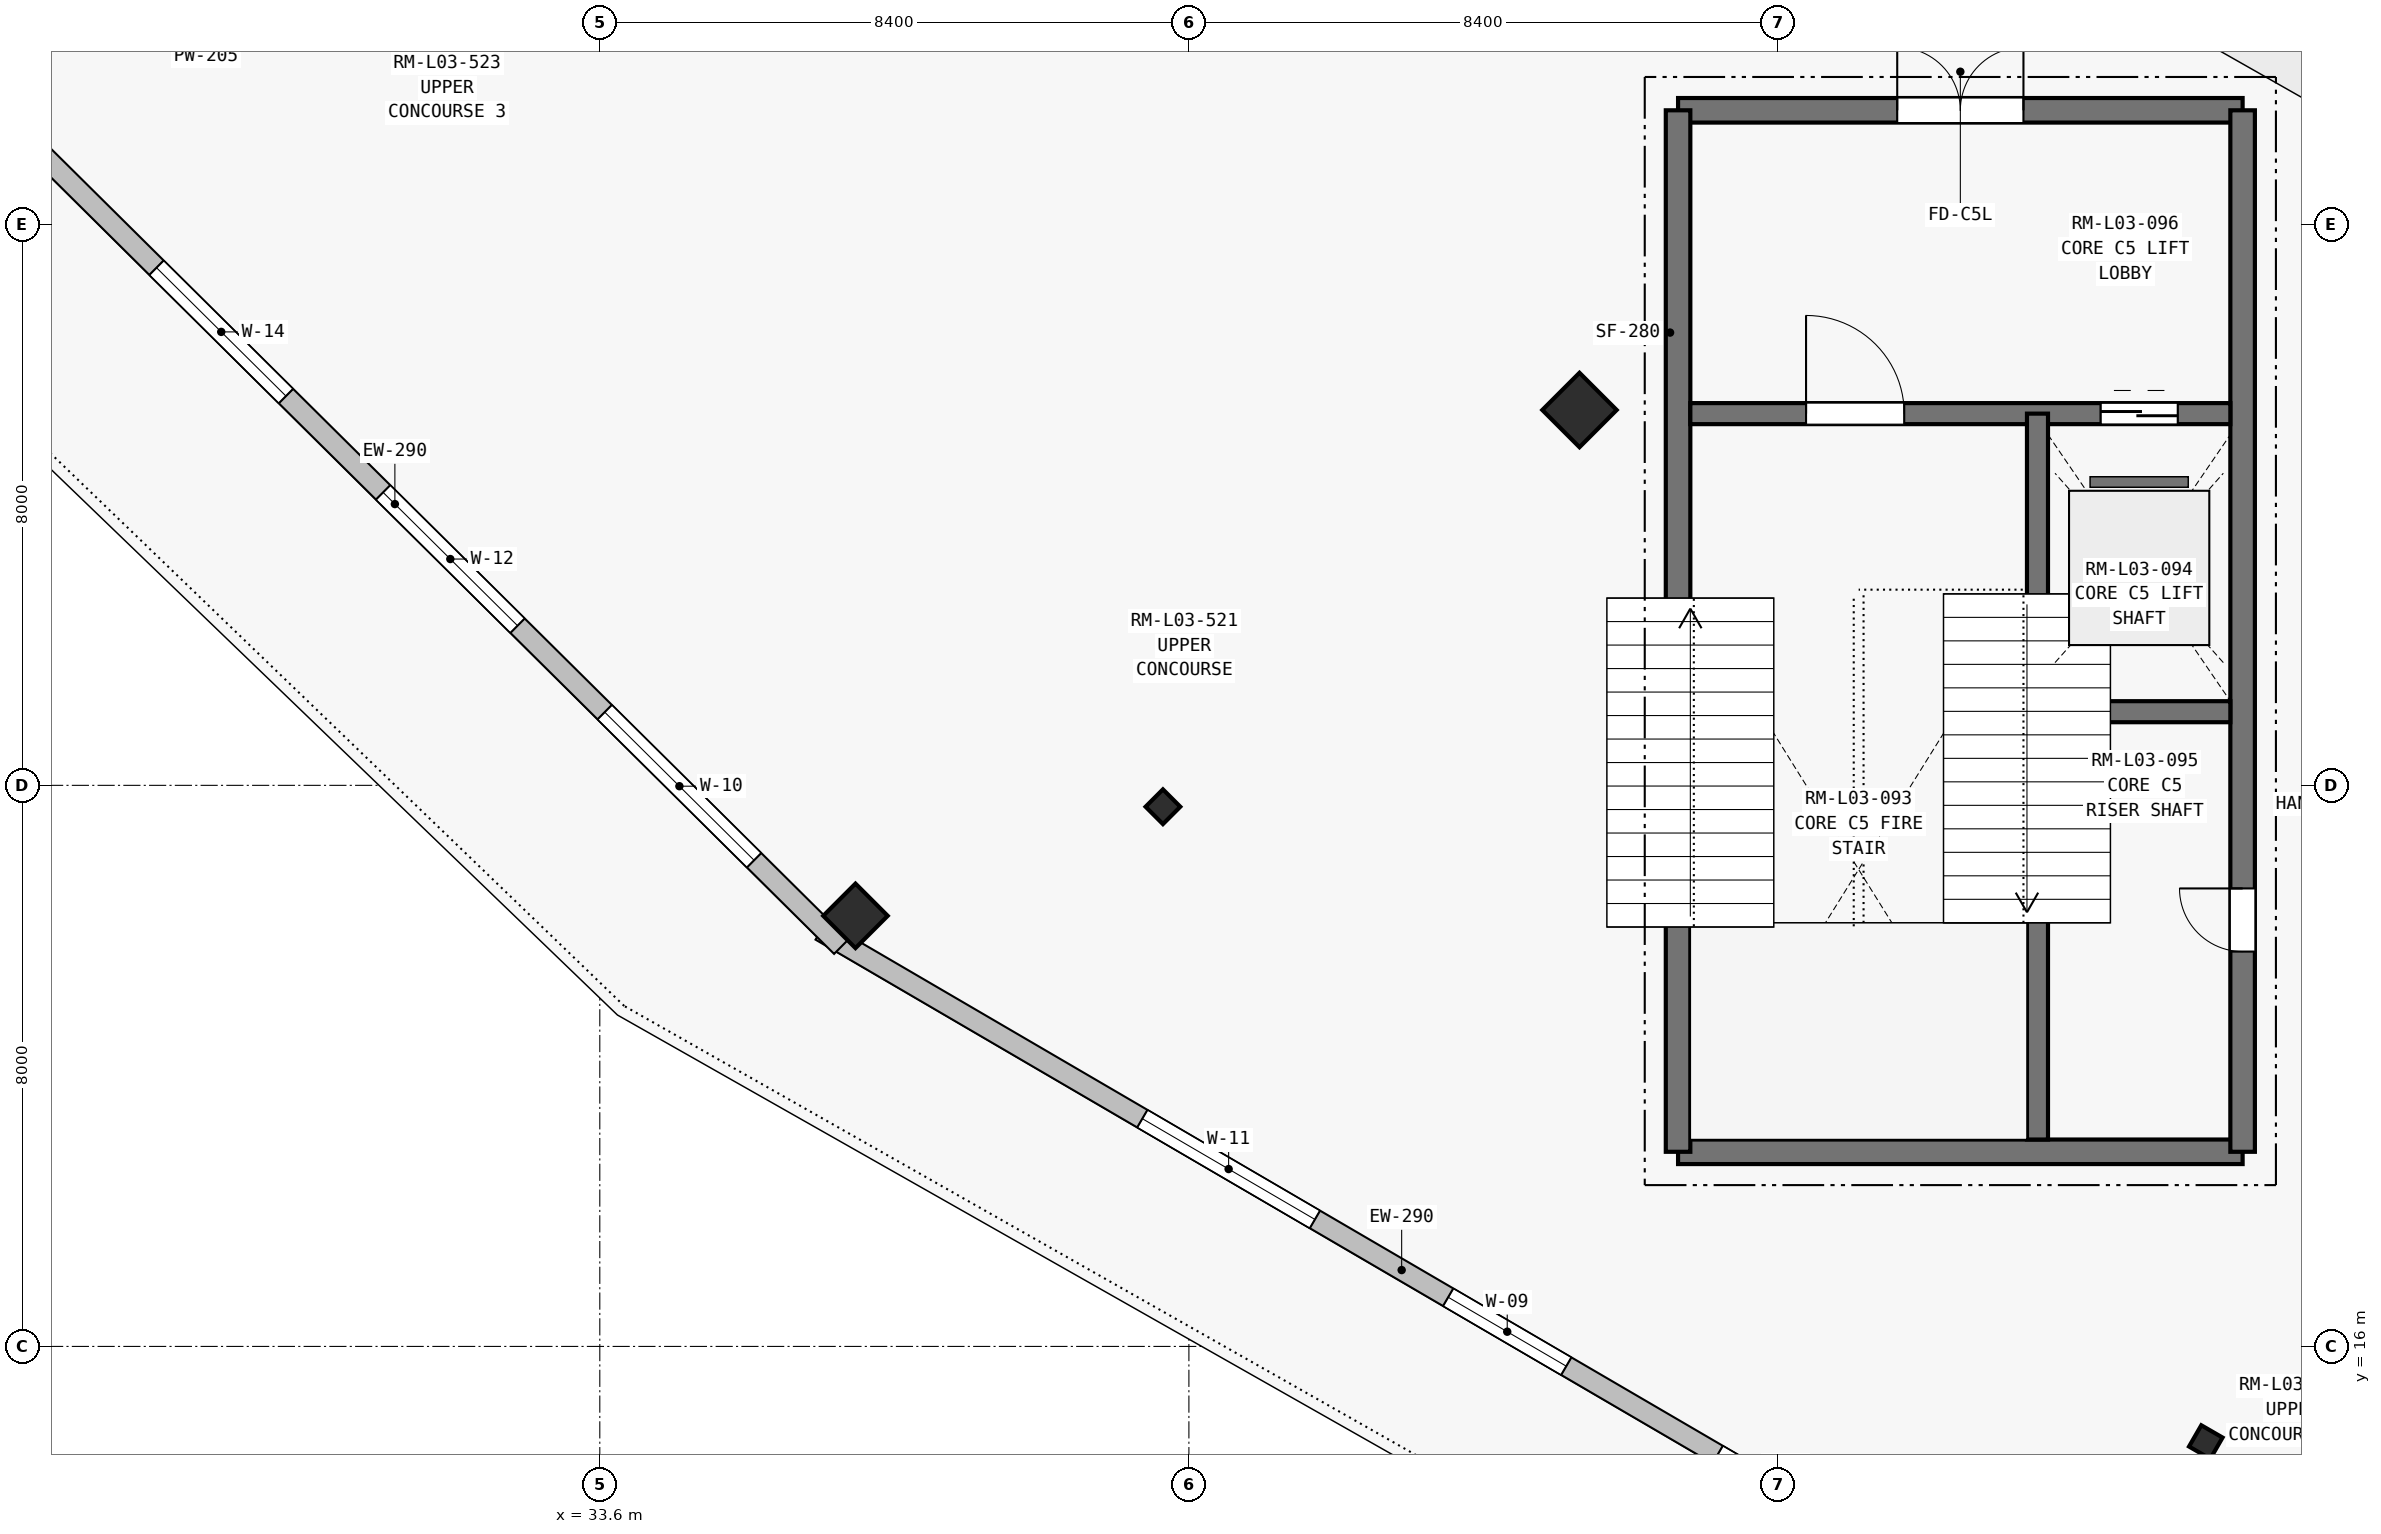
"""IFC4 building model, lengths in metres.
Left out: names, types, materials, properties, quantities, classifications, styles, units other than length and angle.
Written with IfcOpenShell. Run it as: python <this file> out.ifc"""

import sys

from ifc_helpers import new_model, si_unit, direction, frame, frame_2d, origin, origin_2d, place, context, subcontext, project, spatial, rectangle, i_section, extrude, element, fill, save


model = new_model("IFC4")
c1 = context("Model", 3, precision=1e-05, world=origin(), true_north=direction((0.0, 1.0)))
c2 = subcontext(c1, "Body", "Model", "MODEL_VIEW")
j1 = project(units=[si_unit("LENGTHUNIT", "METRE"), si_unit("PLANEANGLEUNIT", "RADIAN")], contexts=[c1])
p1 = place(None, origin())
s1 = spatial("IfcSite", under=j1, at=p1, CompositionType="ELEMENT")
p2 = place(p1, origin())
s2 = spatial("IfcBuilding", under=s1, at=p2, CompositionType="ELEMENT")
p3 = place(p2, frame((0.0, 0.0, 14.4)))
s3 = spatial("IfcBuildingStorey", under=s2, at=p3, CompositionType="ELEMENT", Elevation=14.4)
p4 = place(p3, frame((47.569, 29.352, 0.0), z_axis=(0.0, 0.0, 1.0), x_axis=(-0.707106781187, -0.707106781187, 0.0)))
e1 = element("IfcColumn", 1, at=p4, inside=s3, PredefinedType="COLUMN", context=c2, shape_type="SweptSolid", body=[
    extrude(rectangle(XDim=0.75, YDim=0.75, at=origin_2d()), origin(), (0.0, 0.0, 1.0), 4.5),
])
for number, where, z_axis, x_axis in (
    (2, (41.63, 23.695, 0.0), (0.0, 0.0, 1.0), (-0.707, -0.707, 0.0)),
    (3, (56.5, 14.637, 0.0), (0.0, 0.0, 1.0), (-0.5, -0.866, 0.0)),
):
    element("IfcColumn", number, at=place(p3, frame(where, z_axis=z_axis, x_axis=x_axis)), inside=s3, PredefinedType="COLUMN", context=c2, shape_type="SweptSolid", body=[
        extrude(i_section(OverallWidth=0.35, OverallDepth=0.35, WebThickness=0.014, FlangeThickness=0.024, at=origin_2d()), origin(), (0.0, 0.0, 1.0), 4.5),
    ])
p5 = place(p3, frame((37.246, 22.139, 0.0), z_axis=(0.0, 0.0, 1.0), x_axis=(-0.707106781187, -0.707106781187, 0.0)))
e4 = element("IfcColumn", 4, at=p5, inside=s3, PredefinedType="COLUMN", context=c2, shape_type="SweptSolid", body=[
    extrude(rectangle(XDim=0.65, YDim=0.65, at=origin_2d()), origin(), (0.0, 0.0, 1.0), 4.26),
])
p6 = place(p3, frame((53.318, 12.252, 0.0), z_axis=(0.0, 0.0, 1.0), x_axis=(-0.863607623942, 0.504164528572, 0.0)))
e5 = element("IfcWall", 5, at=p6, inside=s3, PredefinedType="SOLIDWALL", context=c2, shape_type="SweptSolid", body=[
    extrude(rectangle(XDim=19.186, YDim=0.29, at=frame_2d((9.593, 0.0))), origin(), (0.0, 0.0, 1.0), 4.26),
])
p7 = place(p6, frame((2.125, 0.0, 0.9)))
e6 = element("IfcOpeningElement", 6, at=p7, cuts=e5, PredefinedType="OPENING", context=c2, shape_type="SweptSolid", body=[
    extrude(rectangle(XDim=2.25, YDim=2.1, at=frame_2d((1.125, 1.05))), frame((0.0, 0.155, 0.0), z_axis=(0.0, -1.0, 0.0), x_axis=(1.0, 0.0, 0.0)), (0.0, 0.0, 1.0), 0.31),
])
p8 = place(p6, frame((6.875, 0.0, 0.9)))
e7 = element("IfcOpeningElement", 7, at=p8, cuts=e5, PredefinedType="OPENING", context=c2, shape_type="SweptSolid", body=[
    extrude(rectangle(XDim=1.95, YDim=2.0, at=frame_2d((0.975, 1.0))), frame((0.0, 0.155, 0.0), z_axis=(0.0, -1.0, 0.0), x_axis=(1.0, 0.0, 0.0)), (0.0, 0.0, 1.0), 0.31),
])
p9 = place(p6, frame((11.025, 0.0, 0.9)))
e8 = element("IfcOpeningElement", 8, at=p9, cuts=e5, PredefinedType="OPENING", context=c2, shape_type="SweptSolid", body=[
    extrude(rectangle(XDim=2.85, YDim=1.6, at=frame_2d((1.425, 0.8))), frame((0.0, 0.155, 0.0), z_axis=(0.0, -1.0, 0.0), x_axis=(1.0, 0.0, 0.0)), (0.0, 0.0, 1.0), 0.31),
])
p10 = place(p3, frame((37.043, 21.699, 0.0), z_axis=(0.0, 0.0, 1.0), x_axis=(-0.71011693404, 0.704083759214, 0.0)))
e9 = element("IfcWall", 9, at=p10, inside=s3, PredefinedType="SOLIDWALL", context=c2, shape_type="SweptSolid", body=[
    extrude(rectangle(XDim=17.927, YDim=0.29, at=frame_2d((8.963, 0.0))), origin(), (0.0, 0.0, 1.0), 4.26),
])
p11 = place(p10, frame((1.75, 0.0, 0.9)))
e10 = element("IfcOpeningElement", 10, at=p11, cuts=e9, PredefinedType="OPENING", context=c2, shape_type="SweptSolid", body=[
    extrude(rectangle(XDim=3.0, YDim=1.6, at=frame_2d((1.5, 0.8))), frame((0.0, 0.155, 0.0), z_axis=(0.0, -1.0, 0.0), x_axis=(1.0, 0.0, 0.0)), (0.0, 0.0, 1.0), 0.31),
])
p12 = place(p10, frame((6.5, 0.0, 0.9)))
e11 = element("IfcOpeningElement", 11, at=p12, cuts=e9, PredefinedType="OPENING", context=c2, shape_type="SweptSolid", body=[
    extrude(rectangle(XDim=2.7, YDim=1.55, at=frame_2d((1.35, 0.775))), frame((0.0, 0.155, 0.0), z_axis=(0.0, -1.0, 0.0), x_axis=(1.0, 0.0, 0.0)), (0.0, 0.0, 1.0), 0.31),
])
p13 = place(p10, frame((11.15, 0.0, 0.9)))
e12 = element("IfcOpeningElement", 12, at=p13, cuts=e9, PredefinedType="OPENING", context=c2, shape_type="SweptSolid", body=[
    extrude(rectangle(XDim=2.6, YDim=1.4, at=frame_2d((1.3, 0.7))), frame((0.0, 0.155, 0.0), z_axis=(0.0, -1.0, 0.0), x_axis=(1.0, 0.0, 0.0)), (0.0, 0.0, 1.0), 0.31),
])
p14 = place(p3, frame((48.975, 18.775, 0.0), z_axis=(0.0, 0.0, 1.0), x_axis=(1.0, 0.0, 0.0)))
e13 = element("IfcWall", 13, at=p14, inside=s3, PredefinedType="SHEAR", context=c2, shape_type="SweptSolid", body=[
    extrude(rectangle(XDim=8.05, YDim=0.35, at=frame_2d((4.025, 0.0))), origin(), (0.0, 0.0, 1.0), 4.5),
])
p15 = place(p3, frame((48.975, 33.625, 0.0), z_axis=(0.0, 0.0, 1.0), x_axis=(1.0, 0.0, 0.0)))
e14 = element("IfcWall", 14, at=p15, inside=s3, PredefinedType="SHEAR", context=c2, shape_type="SweptSolid", body=[
    extrude(rectangle(XDim=8.05, YDim=0.35, at=frame_2d((4.025, 0.0))), origin(), (0.0, 0.0, 1.0), 4.5),
])
p16 = place(p15, frame((3.125, 0.0, 0.0)))
e15 = element("IfcOpeningElement", 15, at=p16, cuts=e14, PredefinedType="OPENING", context=c2, shape_type="SweptSolid", body=[
    extrude(rectangle(XDim=1.8, YDim=2.25, at=frame_2d((0.9, 1.125))), frame((0.0, 0.185, 0.0), z_axis=(0.0, -1.0, 0.0), x_axis=(1.0, 0.0, 0.0)), (0.0, 0.0, 1.0), 0.37),
])
p17 = place(p3, frame((48.975, 18.775, 0.0), z_axis=(0.0, 0.0, 1.0), x_axis=(0.0, 1.0, 0.0)))
e16 = element("IfcWall", 16, at=p17, inside=s3, PredefinedType="SHEAR", context=c2, shape_type="SweptSolid", body=[
    extrude(rectangle(XDim=14.85, YDim=0.35, at=frame_2d((7.425, 0.0))), origin(), (0.0, 0.0, 1.0), 4.5),
])
p18 = place(p3, frame((57.025, 18.775, 0.0), z_axis=(0.0, 0.0, 1.0), x_axis=(0.0, 1.0, 0.0)))
e17 = element("IfcWall", 17, at=p18, inside=s3, PredefinedType="SHEAR", context=c2, shape_type="SweptSolid", body=[
    extrude(rectangle(XDim=14.85, YDim=0.35, at=frame_2d((7.425, 0.0))), origin(), (0.0, 0.0, 1.0), 4.5),
])
p19 = place(p18, frame((2.855, 0.0, 0.0)))
e18 = element("IfcOpeningElement", 18, at=p19, cuts=e17, PredefinedType="OPENING", context=c2, shape_type="SweptSolid", body=[
    extrude(rectangle(XDim=0.9, YDim=2.1, at=frame_2d((0.45, 1.05))), frame((0.0, 0.185, 0.0), z_axis=(0.0, -1.0, 0.0), x_axis=(1.0, 0.0, 0.0)), (0.0, 0.0, 1.0), 0.37),
])
p20 = place(p3, frame((49.15, 29.3, 0.0), z_axis=(0.0, 0.0, 1.0), x_axis=(1.0, 0.0, 0.0)))
e19 = element("IfcWall", 19, at=p20, inside=s3, PredefinedType="SHEAR", context=c2, shape_type="SweptSolid", body=[
    extrude(rectangle(XDim=7.7, YDim=0.3, at=frame_2d((3.85, 0.0))), origin(), (0.0, 0.0, 1.0), 4.5),
])
p21 = place(p20, frame((1.65, 0.0, 0.0)))
e20 = element("IfcOpeningElement", 20, at=p21, cuts=e19, PredefinedType="OPENING", context=c2, shape_type="SweptSolid", body=[
    extrude(rectangle(XDim=1.4, YDim=2.2, at=frame_2d((0.7, 1.1))), frame((0.0, 0.16, 0.0), z_axis=(0.0, -1.0, 0.0), x_axis=(1.0, 0.0, 0.0)), (0.0, 0.0, 1.0), 0.32),
])
p22 = place(p20, frame((5.85, 0.0, 0.0)))
e21 = element("IfcOpeningElement", 21, at=p22, cuts=e19, PredefinedType="OPENING", context=c2, shape_type="SweptSolid", body=[
    extrude(rectangle(XDim=1.1, YDim=2.2, at=frame_2d((0.55, 1.1))), frame((0.0, 0.16, 0.0), z_axis=(0.0, -1.0, 0.0), x_axis=(1.0, 0.0, 0.0)), (0.0, 0.0, 1.0), 0.32),
])
p23 = place(p3, frame((54.1, 18.95, 0.0), z_axis=(0.0, 0.0, 1.0), x_axis=(0.0, 1.0, 0.0)))
e22 = element("IfcWall", 22, at=p23, inside=s3, PredefinedType="SHEAR", context=c2, shape_type="SweptSolid", body=[
    extrude(rectangle(XDim=10.35, YDim=0.3, at=frame_2d((5.175, 0.0))), origin(), (0.0, 0.0, 1.0), 4.5),
])
p24 = place(p3, frame((54.25, 25.05, 0.0), z_axis=(0.0, 0.0, 1.0), x_axis=(1.0, 0.0, 0.0)))
e23 = element("IfcWall", 23, at=p24, inside=s3, PredefinedType="SHEAR", context=c2, shape_type="SweptSolid", body=[
    extrude(rectangle(XDim=2.6, YDim=0.3, at=frame_2d((1.3, 0.0))), origin(), (0.0, 0.0, 1.0), 4.5),
])
p25 = place(p7, origin())
e24 = element("IfcWindow", 24, at=p25, inside=s3, PartitioningType="SINGLE_PANEL", PredefinedType="WINDOW", context=c2, shape_type="SweptSolid", body=[
    extrude(rectangle(XDim=2.25, YDim=2.1, at=frame_2d((1.125, 1.05))), frame((0.0, 0.03, 0.0), z_axis=(0.0, -1.0, 0.0), x_axis=(1.0, 0.0, 0.0)), (0.0, 0.0, 1.0), 0.06),
])
fill(e6, e24)
p26 = place(p8, origin())
e25 = element("IfcWindow", 25, at=p26, inside=s3, PartitioningType="SINGLE_PANEL", PredefinedType="WINDOW", context=c2, shape_type="SweptSolid", body=[
    extrude(rectangle(XDim=1.95, YDim=2.0, at=frame_2d((0.975, 1.0))), frame((0.0, 0.03, 0.0), z_axis=(0.0, -1.0, 0.0), x_axis=(1.0, 0.0, 0.0)), (0.0, 0.0, 1.0), 0.06),
])
fill(e7, e25)
p27 = place(p9, origin())
e26 = element("IfcWindow", 26, at=p27, inside=s3, PartitioningType="SINGLE_PANEL", PredefinedType="WINDOW", context=c2, shape_type="SweptSolid", body=[
    extrude(rectangle(XDim=2.85, YDim=1.6, at=frame_2d((1.425, 0.8))), frame((0.0, 0.03, 0.0), z_axis=(0.0, -1.0, 0.0), x_axis=(1.0, 0.0, 0.0)), (0.0, 0.0, 1.0), 0.06),
])
fill(e8, e26)
p28 = place(p11, origin())
e27 = element("IfcWindow", 27, at=p28, inside=s3, PartitioningType="SINGLE_PANEL", PredefinedType="WINDOW", context=c2, shape_type="SweptSolid", body=[
    extrude(rectangle(XDim=3.0, YDim=1.6, at=frame_2d((1.5, 0.8))), frame((0.0, 0.03, 0.0), z_axis=(0.0, -1.0, 0.0), x_axis=(1.0, 0.0, 0.0)), (0.0, 0.0, 1.0), 0.06),
])
fill(e10, e27)
p29 = place(p12, origin())
e28 = element("IfcWindow", 28, at=p29, inside=s3, PartitioningType="SINGLE_PANEL", PredefinedType="WINDOW", context=c2, shape_type="SweptSolid", body=[
    extrude(rectangle(XDim=2.7, YDim=1.55, at=frame_2d((1.35, 0.775))), frame((0.0, 0.03, 0.0), z_axis=(0.0, -1.0, 0.0), x_axis=(1.0, 0.0, 0.0)), (0.0, 0.0, 1.0), 0.06),
])
fill(e11, e28)
p30 = place(p13, origin())
e29 = element("IfcWindow", 29, at=p30, inside=s3, PartitioningType="SINGLE_PANEL", PredefinedType="WINDOW", context=c2, shape_type="SweptSolid", body=[
    extrude(rectangle(XDim=2.6, YDim=1.4, at=frame_2d((1.3, 0.7))), frame((0.0, 0.03, 0.0), z_axis=(0.0, -1.0, 0.0), x_axis=(1.0, 0.0, 0.0)), (0.0, 0.0, 1.0), 0.06),
])
fill(e12, e29)
p31 = place(p16, origin())
e30 = element("IfcDoor", 30, at=p31, inside=s3, OperationType="DOUBLE_DOOR_SINGLE_SWING", PredefinedType="DOOR", context=c2, shape_type="SweptSolid", body=[
    extrude(rectangle(XDim=1.8, YDim=2.25, at=frame_2d((0.9, 1.125))), frame((0.0, 0.025, 0.0), z_axis=(0.0, -1.0, 0.0), x_axis=(1.0, 0.0, 0.0)), (0.0, 0.0, 1.0), 0.05),
])
fill(e15, e30)
p32 = place(p21, origin())
e31 = element("IfcDoor", 31, at=p32, inside=s3, OperationType="SINGLE_SWING_LEFT", PredefinedType="DOOR", context=c2, shape_type="SweptSolid", body=[
    extrude(rectangle(XDim=1.4, YDim=2.2, at=frame_2d((0.7, 1.1))), frame((0.0, 0.025, 0.0), z_axis=(0.0, -1.0, 0.0), x_axis=(1.0, 0.0, 0.0)), (0.0, 0.0, 1.0), 0.05),
])
fill(e20, e31)
p33 = place(p19, origin())
e32 = element("IfcDoor", 32, at=p33, inside=s3, OperationType="SINGLE_SWING_RIGHT", PredefinedType="DOOR", context=c2, shape_type="SweptSolid", body=[
    extrude(rectangle(XDim=0.9, YDim=2.1, at=frame_2d((0.45, 1.05))), frame((0.0, 0.025, 0.0), z_axis=(0.0, -1.0, 0.0), x_axis=(1.0, 0.0, 0.0)), (0.0, 0.0, 1.0), 0.05),
])
fill(e18, e32)
p34 = place(p22, origin())
e33 = element("IfcDoor", 33, at=p34, inside=s3, OperationType="SLIDING_TO_LEFT", PredefinedType="DOOR", context=c2, shape_type="SweptSolid", body=[
    extrude(rectangle(XDim=1.1, YDim=2.2, at=frame_2d((0.55, 1.1))), frame((0.0, 0.025, 0.0), z_axis=(0.0, -1.0, 0.0), x_axis=(1.0, 0.0, 0.0)), (0.0, 0.0, 1.0), 0.05),
])
fill(e21, e33)
save(model, sys.argv[1])
